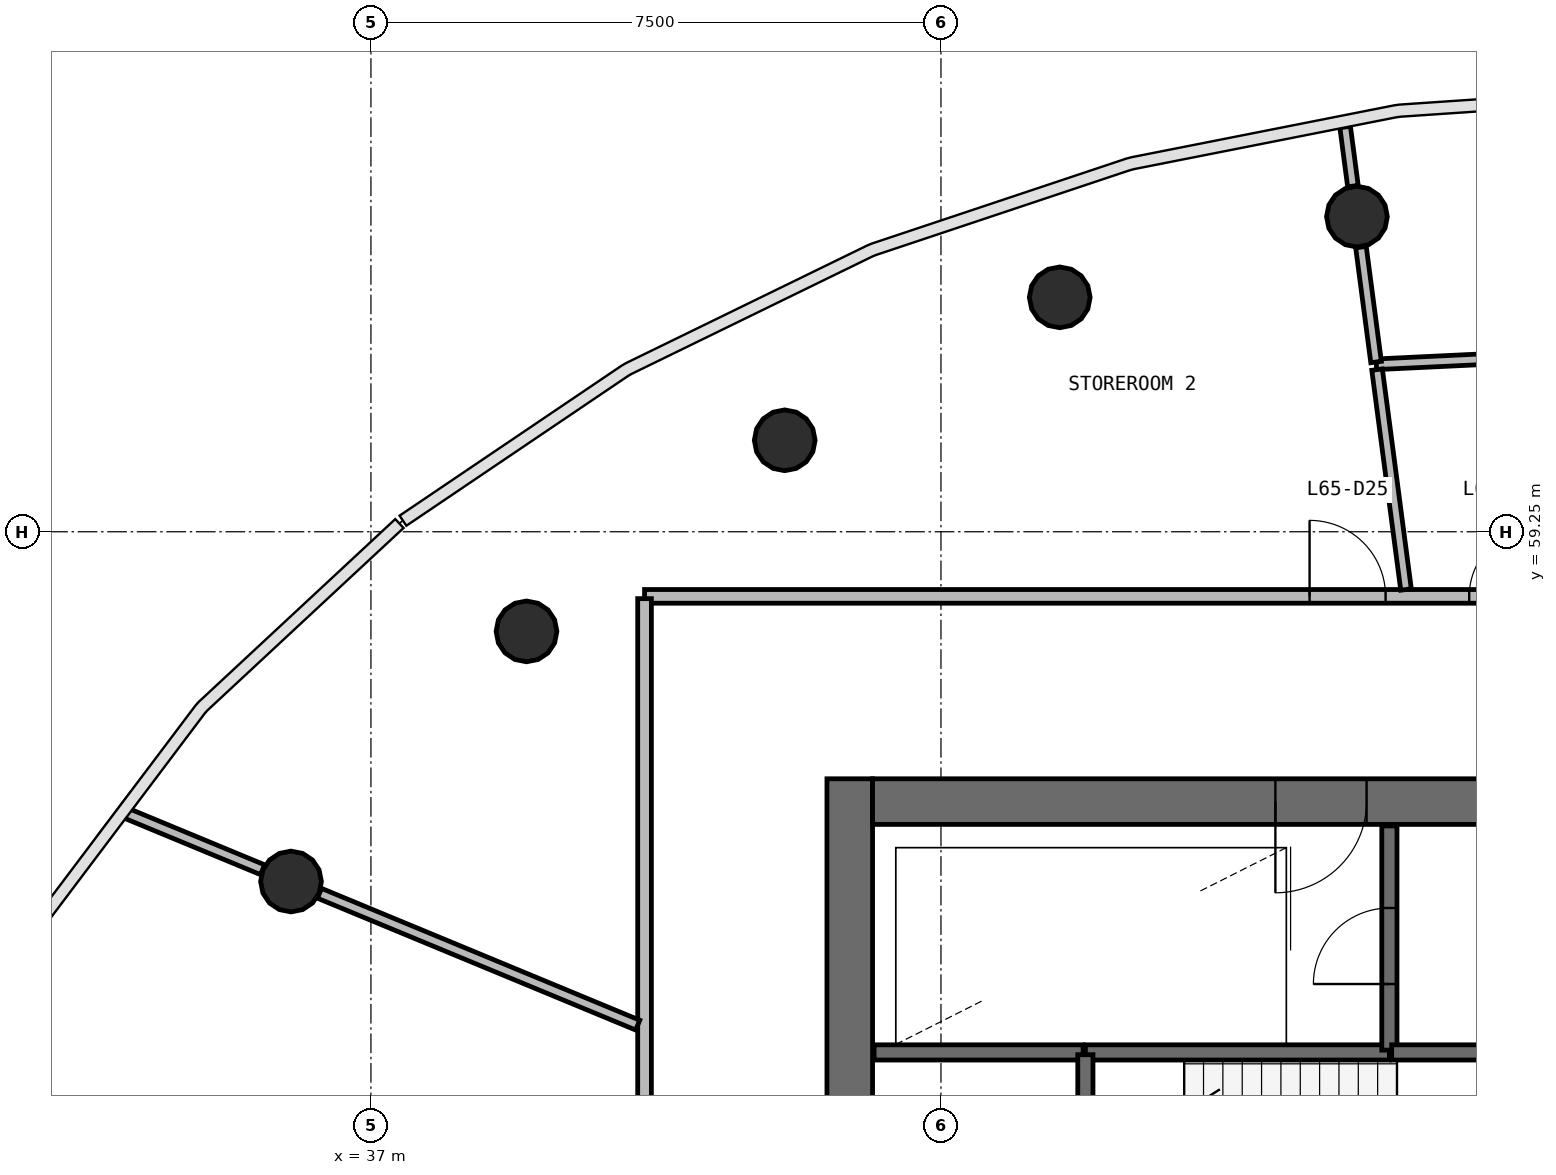
"""IFC4 building model, lengths in metres.
Left out: names, types, materials, properties, quantities, classifications, styles, units other than length and angle.
Written with IfcOpenShell. Run it as: python <this file> out.ifc"""

import sys

from ifc_helpers import new_model, si_unit, direction, frame, frame_2d, origin, origin_2d, place, context, subcontext, project, spatial, rectangle, circle, extrude, source, transform, mapped, element, fill, save


model = new_model("IFC4")
c1 = context("Model", 3, precision=1e-05, world=origin(), true_north=direction((0.0, 1.0)))
c2 = subcontext(c1, "Body", "Model", "MODEL_VIEW")
j1 = project(units=[si_unit("LENGTHUNIT", "METRE"), si_unit("PLANEANGLEUNIT", "RADIAN")], contexts=[c1])
p1 = place(None, origin())
s1 = spatial("IfcSite", under=j1, at=p1, CompositionType="ELEMENT")
p2 = place(p1, origin())
s2 = spatial("IfcBuilding", under=s1, at=p2, CompositionType="ELEMENT")
p3 = place(p2, frame((0.0, 0.0, 265.7)))
s3 = spatial("IfcBuildingStorey", under=s2, at=p3, CompositionType="ELEMENT", Elevation=265.7)
p4 = place(p3, frame((43.3, 56.0, 0.0), z_axis=(0.0, 0.0, 1.0), x_axis=(0.0, -1.0, 0.0)))
e1 = element("IfcWall", 1, at=p4, inside=s3, PredefinedType="SHEAR", context=c2, shape_type="SweptSolid", body=[
    extrude(rectangle(XDim=16.0, YDim=0.6, at=frame_2d((8.0, 0.0))), origin(), (0.0, 0.0, 1.0), 3.9),
])
p5 = place(p4, frame((7.1, 0.0, 0.0)))
e2 = element("IfcOpeningElement", 2, at=p5, cuts=e1, PredefinedType="OPENING", context=c2, shape_type="SweptSolid", body=[
    extrude(rectangle(XDim=1.8, YDim=2.1, at=frame_2d((0.9, 1.05))), frame((0.0, 0.31, 0.0), z_axis=(0.0, -1.0, 0.0), x_axis=(1.0, 0.0, 0.0)), (0.0, 0.0, 1.0), 0.62),
])
p6 = place(p3, frame((60.4, 55.7, 0.0), z_axis=(0.0, 0.0, 1.0), x_axis=(-1.0, 0.0, 0.0)))
e3 = element("IfcWall", 3, at=p6, inside=s3, PredefinedType="SHEAR", context=c2, shape_type="SweptSolid", body=[
    extrude(rectangle(XDim=16.8, YDim=0.6, at=frame_2d((8.4, 0.0))), origin(), (0.0, 0.0, 1.0), 3.9),
])
p7 = place(p6, frame((0.4, 0.0, 0.0)))
e4 = element("IfcOpeningElement", 4, at=p7, cuts=e3, PredefinedType="OPENING", context=c2, shape_type="SweptSolid", body=[
    extrude(rectangle(XDim=1.1, YDim=2.1, at=frame_2d((0.55, 1.05))), frame((0.0, 0.31, 0.0), z_axis=(0.0, -1.0, 0.0), x_axis=(1.0, 0.0, 0.0)), (0.0, 0.0, 1.0), 0.62),
])
p8 = place(p6, frame((10.3, 0.0, 0.0)))
e5 = element("IfcOpeningElement", 5, at=p8, cuts=e3, PredefinedType="OPENING", context=c2, shape_type="SweptSolid", body=[
    extrude(rectangle(XDim=1.2, YDim=2.1, at=frame_2d((0.6, 1.05))), frame((0.0, 0.31, 0.0), z_axis=(0.0, -1.0, 0.0), x_axis=(1.0, 0.0, 0.0)), (0.0, 0.0, 1.0), 0.62),
])
p9 = place(p6, frame((7.25, 0.0, 0.0)))
e6 = element("IfcOpeningElement", 6, at=p9, cuts=e3, PredefinedType="OPENING", context=c2, shape_type="SweptSolid", body=[
    extrude(rectangle(XDim=1.1, YDim=2.1, at=frame_2d((0.55, 1.05))), frame((0.0, 0.31, 0.0), z_axis=(0.0, -1.0, 0.0), x_axis=(1.0, 0.0, 0.0)), (0.0, 0.0, 1.0), 0.62),
])
m1 = source(origin(), c2, "Body", "SweptSolid", [
    extrude(circle(Radius=0.4, at=origin_2d()), origin(), (0.0, 0.0, 1.0), 3.9),
])
for number, where, z_axis, x_axis in (
    (7, (49.973, 63.396, 0.0), (0.0, 0.0, 1.0), (1.0, 0.0, 0.0)),
    (8, (46.063, 62.334, 0.0), (0.0, 0.0, 1.0), (1.0, 0.0, 0.0)),
    (9, (42.444, 60.453, 0.0), (0.0, 0.0, 1.0), (1.0, 0.0, 0.0)),
    (10, (39.047, 57.939, 0.0), (0.0, 0.0, 1.0), (1.0, 0.0, 0.0)),
    (11, (35.948, 54.649, 0.0), (0.0, 0.0, 1.0), (1.0, 0.0, 0.0)),
):
    element("IfcColumn", number, at=place(p3, frame(where, z_axis=z_axis, x_axis=x_axis)), inside=s3, PredefinedType="COLUMN", context=c2, shape_type="MappedRepresentation", body=[
        mapped(m1, transform((0.0, 0.0, 0.0), scale=1.0)),
    ])
p10 = place(p3, frame((46.4, 52.4, 0.0), z_axis=(0.0, 0.0, 1.0), x_axis=(1.0, 0.0, 0.0)))
e12 = element("IfcWall", 12, at=p10, inside=s3, PredefinedType="SOLIDWALL", context=c2, shape_type="SweptSolid", body=[
    extrude(rectangle(XDim=4.0, YDim=0.2, at=frame_2d((2.0, 0.0))), origin(), (0.0, 0.0, 1.0), 3.62),
])
p11 = place(p3, frame((50.4, 52.43, 0.0), z_axis=(0.0, 0.0, 1.0), x_axis=(0.0, 1.0, 0.0)))
e13 = element("IfcWall", 13, at=p11, inside=s3, PredefinedType="SOLIDWALL", context=c2, shape_type="SweptSolid", body=[
    extrude(rectangle(XDim=2.95, YDim=0.2, at=frame_2d((1.475, 0.0))), origin(), (0.0, 0.0, 1.0), 2.7),
])
p12 = place(p11, frame((0.87, 0.0, 0.0)))
e14 = element("IfcOpeningElement", 14, at=p12, cuts=e13, PredefinedType="OPENING", context=c2, shape_type="SweptSolid", body=[
    extrude(rectangle(XDim=1.0, YDim=2.1, at=frame_2d((0.5, 1.05))), frame((0.0, 0.11, 0.0), z_axis=(0.0, -1.0, 0.0), x_axis=(1.0, 0.0, 0.0)), (0.0, 0.0, 1.0), 0.22),
])
p13 = place(p3, frame((43.62, 52.4, 0.0), z_axis=(0.0, 0.0, 1.0), x_axis=(1.0, 0.0, 0.0)))
e15 = element("IfcWall", 15, at=p13, inside=s3, PredefinedType="SOLIDWALL", context=c2, shape_type="SweptSolid", body=[
    extrude(rectangle(XDim=2.75, YDim=0.2, at=frame_2d((1.375, 0.0))), origin(), (0.0, 0.0, 1.0), 2.7),
])
p14 = place(p3, frame((46.4, 52.37, 0.0), z_axis=(0.0, 0.0, 1.0), x_axis=(0.0, -1.0, 0.0)))
e16 = element("IfcWall", 16, at=p14, inside=s3, PredefinedType="SOLIDWALL", context=c2, shape_type="SweptSolid", body=[
    extrude(rectangle(XDim=2.36, YDim=0.2, at=frame_2d((1.18, 0.0))), origin(), (0.0, 0.0, 1.0), 3.62),
])
p15 = place(p3, frame((50.43, 52.4, 0.0), z_axis=(0.0, 0.0, 1.0), x_axis=(1.0, 0.0, 0.0)))
e17 = element("IfcWall", 17, at=p15, inside=s3, PredefinedType="SOLIDWALL", context=c2, shape_type="SweptSolid", body=[
    extrude(rectangle(XDim=1.34, YDim=0.2, at=frame_2d((0.67, 0.0))), origin(), (0.0, 0.0, 1.0), 3.62),
])
p16 = place(p3, frame((40.6, 58.4, 0.0), z_axis=(0.0, 0.0, 1.0), x_axis=(1.0, 0.0, 0.0)))
e18 = element("IfcWall", 18, at=p16, inside=s3, PredefinedType="PARTITIONING", context=c2, shape_type="SweptSolid", body=[
    extrude(rectangle(XDim=22.8, YDim=0.18, at=frame_2d((11.4, 0.0))), origin(), (0.0, 0.0, 1.0), 2.92),
])
p17 = place(p16, frame((13.05, 0.0, 0.0)))
e19 = element("IfcOpeningElement", 19, at=p17, cuts=e18, PredefinedType="OPENING", context=c2, shape_type="SweptSolid", body=[
    extrude(rectangle(XDim=0.9, YDim=2.1, at=frame_2d((0.45, 1.05))), frame((0.0, 0.1, 0.0), z_axis=(0.0, -1.0, 0.0), x_axis=(1.0, 0.0, 0.0)), (0.0, 0.0, 1.0), 0.2),
])
p18 = place(p16, frame((10.85, 0.0, 0.0)))
e20 = element("IfcOpeningElement", 20, at=p18, cuts=e18, PredefinedType="OPENING", context=c2, shape_type="SweptSolid", body=[
    extrude(rectangle(XDim=0.9, YDim=2.1, at=frame_2d((0.45, 1.05))), frame((0.0, 0.1, 0.0), z_axis=(0.0, -1.0, 0.0), x_axis=(1.0, 0.0, 0.0)), (0.0, 0.0, 1.0), 0.2),
])
p19 = place(p16, frame((8.75, 0.0, 0.0)))
e21 = element("IfcOpeningElement", 21, at=p19, cuts=e18, PredefinedType="OPENING", context=c2, shape_type="SweptSolid", body=[
    extrude(rectangle(XDim=1.0, YDim=2.1, at=frame_2d((0.5, 1.05))), frame((0.0, 0.1, 0.0), z_axis=(0.0, -1.0, 0.0), x_axis=(1.0, 0.0, 0.0)), (0.0, 0.0, 1.0), 0.2),
])
p20 = place(p16, frame((16.15, 0.0, 0.0)))
e22 = element("IfcOpeningElement", 22, at=p20, cuts=e18, PredefinedType="OPENING", context=c2, shape_type="SweptSolid", body=[
    extrude(rectangle(XDim=1.0, YDim=2.1, at=frame_2d((0.5, 1.05))), frame((0.0, 0.1, 0.0), z_axis=(0.0, -1.0, 0.0), x_axis=(1.0, 0.0, 0.0)), (0.0, 0.0, 1.0), 0.2),
])
p21 = place(p3, frame((40.6, 37.63, 0.0), z_axis=(0.0, 0.0, 1.0), x_axis=(0.0, 1.0, 0.0)))
e23 = element("IfcWall", 23, at=p21, inside=s3, PredefinedType="PARTITIONING", context=c2, shape_type="SweptSolid", body=[
    extrude(rectangle(XDim=20.74, YDim=0.18, at=frame_2d((10.37, 0.0))), origin(), (0.0, 0.0, 1.0), 2.92),
])
p22 = place(p21, frame((9.89, 0.0, 0.0)))
e24 = element("IfcOpeningElement", 24, at=p22, cuts=e23, PredefinedType="OPENING", context=c2, shape_type="SweptSolid", body=[
    extrude(rectangle(XDim=1.0, YDim=2.1, at=frame_2d((0.5, 1.05))), frame((0.0, 0.1, 0.0), z_axis=(0.0, -1.0, 0.0), x_axis=(1.0, 0.0, 0.0)), (0.0, 0.0, 1.0), 0.2),
])
p23 = place(p21, frame((4.29, 0.0, 0.0)))
e25 = element("IfcOpeningElement", 25, at=p23, cuts=e23, PredefinedType="OPENING", context=c2, shape_type="SweptSolid", body=[
    extrude(rectangle(XDim=1.0, YDim=2.1, at=frame_2d((0.5, 1.05))), frame((0.0, 0.1, 0.0), z_axis=(0.0, -1.0, 0.0), x_axis=(1.0, 0.0, 0.0)), (0.0, 0.0, 1.0), 0.2),
])
p24 = place(p3, frame((40.51, 52.759, 0.0), z_axis=(0.0, 0.0, 1.0), x_axis=(-0.923863854318, 0.382721280679, 0.0)))
e26 = element("IfcWall", 26, at=p24, inside=s3, PredefinedType="PARTITIONING", context=c2, shape_type="SweptSolid", body=[
    extrude(rectangle(XDim=4.532, YDim=0.14, at=frame_2d((2.266, 0.0))), origin(), (0.0, 0.0, 1.0), 2.92),
])
p25 = place(p3, frame((53.764, 61.622, 0.0), z_axis=(0.0, 0.0, 1.0), x_axis=(-0.998856400799, -0.047810988103, 0.0)))
e27 = element("IfcWall", 27, at=p25, inside=s3, PredefinedType="PARTITIONING", context=c2, shape_type="SweptSolid", body=[
    extrude(rectangle(XDim=3.539, YDim=0.14, at=frame_2d((1.77, 0.0))), origin(), (0.0, 0.0, 1.0), 2.92),
])
p26 = place(p3, frame((50.619, 58.49, 0.0), z_axis=(0.0, 0.0, 1.0), x_axis=(-0.130497790763, 0.991448600083, 0.0)))
e28 = element("IfcWall", 28, at=p26, inside=s3, PredefinedType="PARTITIONING", context=c2, shape_type="SweptSolid", body=[
    extrude(rectangle(XDim=2.918, YDim=0.14, at=frame_2d((1.459, 0.0))), origin(), (0.0, 0.0, 1.0), 2.92),
])
p27 = place(p3, frame((35.574, 54.804, 0.0), z_axis=(0.0, 0.0, 1.0), x_axis=(-0.923874199787, 0.382696306447, 0.0)))
e29 = element("IfcWall", 29, at=p27, inside=s3, PredefinedType="PARTITIONING", context=c2, shape_type="SweptSolid", body=[
    extrude(rectangle(XDim=1.961, YDim=0.14, at=frame_2d((0.98, 0.0))), origin(), (0.0, 0.0, 1.0), 2.92),
])
p28 = place(p3, frame((50.225, 61.483, 0.0), z_axis=(0.0, 0.0, 1.0), x_axis=(-0.130454512571, 0.991454295543, 0.0)))
e30 = element("IfcWall", 30, at=p28, inside=s3, PredefinedType="PARTITIONING", context=c2, shape_type="SweptSolid", body=[
    extrude(rectangle(XDim=1.525, YDim=0.14, at=frame_2d((0.763, 0.0))), origin(), (0.0, 0.0, 1.0), 2.92),
])
p29 = place(p3, frame((49.92, 63.797, 0.0), z_axis=(0.0, 0.0, 1.0), x_axis=(-0.130575144093, 0.991438415508, 0.0)))
e31 = element("IfcWall", 31, at=p29, inside=s3, PredefinedType="PARTITIONING", context=c2, shape_type="SweptSolid", body=[
    extrude(rectangle(XDim=0.785, YDim=0.14, at=frame_2d((0.393, 0.0))), origin(), (0.0, 0.0, 1.0), 2.92),
])
m2 = source(origin(), c2, "Body", "SweptSolid", [
    extrude(rectangle(XDim=1.2, YDim=2.1, at=frame_2d((0.6, 1.05))), frame((0.0, 0.025, 0.0), z_axis=(0.0, -1.0, 0.0), x_axis=(1.0, 0.0, 0.0)), (0.0, 0.0, 1.0), 0.05),
])
p30 = place(p8, origin())
e32 = element("IfcDoor", 32, at=p30, inside=s3, OperationType="SINGLE_SWING_RIGHT", PredefinedType="DOOR", context=c2, shape_type="MappedRepresentation", body=[
    mapped(m2, transform((0.0, 0.0, 0.0), scale=1.0)),
])
fill(e5, e32)
m3 = source(origin(), c2, "Body", "SweptSolid", [
    extrude(rectangle(XDim=1.0, YDim=2.1, at=frame_2d((0.5, 1.05))), frame((0.0, 0.025, 0.0), z_axis=(0.0, -1.0, 0.0), x_axis=(1.0, 0.0, 0.0)), (0.0, 0.0, 1.0), 0.05),
])
p31 = place(p12, origin())
e33 = element("IfcDoor", 33, at=p31, inside=s3, OperationType="SINGLE_SWING_LEFT", PredefinedType="DOOR", context=c2, shape_type="MappedRepresentation", body=[
    mapped(m3, transform((0.0, 0.0, 0.0), scale=1.0)),
])
fill(e14, e33)
m4 = source(origin(), c2, "Body", "SweptSolid", [
    extrude(rectangle(XDim=0.9, YDim=2.1, at=frame_2d((0.45, 1.05))), frame((0.0, 0.025, 0.0), z_axis=(0.0, -1.0, 0.0), x_axis=(1.0, 0.0, 0.0)), (0.0, 0.0, 1.0), 0.05),
])
p32 = place(p18, origin())
e34 = element("IfcDoor", 34, at=p32, inside=s3, OperationType="SINGLE_SWING_RIGHT", PredefinedType="DOOR", context=c2, shape_type="MappedRepresentation", body=[
    mapped(m4, transform((0.0, 0.0, 0.0), scale=1.0)),
])
fill(e20, e34)
m5 = source(origin(), c2, "Body", "SweptSolid", [
    extrude(rectangle(XDim=1.0, YDim=2.1, at=frame_2d((0.5, 1.05))), frame((0.0, 0.025, 0.0), z_axis=(0.0, -1.0, 0.0), x_axis=(1.0, 0.0, 0.0)), (0.0, 0.0, 1.0), 0.05),
])
p33 = place(p19, origin())
e35 = element("IfcDoor", 35, at=p33, inside=s3, OperationType="SINGLE_SWING_LEFT", PredefinedType="DOOR", context=c2, shape_type="MappedRepresentation", body=[
    mapped(m5, transform((0.0, 0.0, 0.0), scale=1.0)),
])
fill(e21, e35)
save(model, sys.argv[1])
